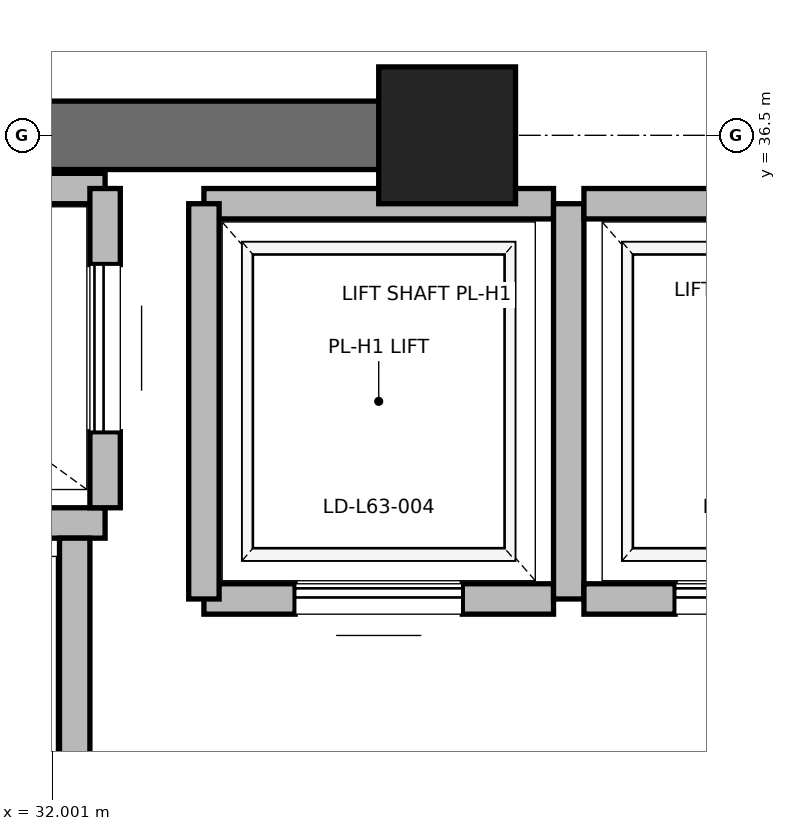
"""IFC4 building model, lengths in metres.
Left out: names, types, materials, properties, quantities, classifications, styles, units other than length and angle.
Written with IfcOpenShell. Run it as: python <this file> out.ifc"""

import sys

from ifc_helpers import new_model, si_unit, direction, frame, frame_2d, origin, origin_2d, place, context, subcontext, project, spatial, rectangle, extrude, element, fill, save


model = new_model("IFC4")
c1 = context("Model", 3, precision=1e-05, world=origin(), true_north=direction((0.0, 1.0)))
c2 = subcontext(c1, "Body", "Model", "MODEL_VIEW")
j1 = project(units=[si_unit("LENGTHUNIT", "METRE"), si_unit("PLANEANGLEUNIT", "RADIAN")], contexts=[c1])
p1 = place(None, origin())
s1 = spatial("IfcSite", under=j1, at=p1, CompositionType="ELEMENT")
p2 = place(p1, origin())
s2 = spatial("IfcBuilding", under=s1, at=p2, CompositionType="ELEMENT")
p3 = place(p2, frame((0.0, 0.0, 271.2)))
s3 = spatial("IfcBuildingStorey", under=s2, at=p3, CompositionType="ELEMENT", Elevation=271.2)
p4 = place(p3, frame((34.6, 36.5, 0.0), z_axis=(0.0, 0.0, 1.0), x_axis=(1.0, 0.0, 0.0)))
e1 = element("IfcColumn", 1, at=p4, inside=s3, PredefinedType="PILASTER", context=c2, shape_type="SweptSolid", body=[
    extrude(rectangle(XDim=0.9, YDim=0.9, at=origin_2d()), origin(), (0.0, 0.0, 1.0), 4.0),
])
p5 = place(p3, frame((29.0, 36.5, 0.0), z_axis=(0.0, 0.0, 1.0), x_axis=(1.0, 0.0, 0.0)))
e2 = element("IfcWall", 2, at=p5, inside=s3, PredefinedType="SHEAR", context=c2, shape_type="SweptSolid", body=[
    extrude(rectangle(XDim=5.8, YDim=0.45, at=frame_2d((2.9, 0.0))), origin(), (0.0, 0.0, 1.0), 3.785),
])
p6 = place(p3, frame((29.55, 33.95, 0.0), z_axis=(0.0, 0.0, 1.0), x_axis=(1.0, 0.0, 0.0)))
e3 = element("IfcWall", 3, at=p6, inside=s3, PredefinedType="SOLIDWALL", context=c2, shape_type="SweptSolid", body=[
    extrude(rectangle(XDim=2.8, YDim=0.2, at=frame_2d((1.4, 0.0))), origin(), (0.0, 0.0, 1.0), 3.785),
])
p7 = place(p3, frame((32.15, 30.85, 0.0), z_axis=(0.0, 0.0, 1.0), x_axis=(0.0, 1.0, 0.0)))
e4 = element("IfcWall", 4, at=p7, inside=s3, PredefinedType="SOLIDWALL", context=c2, shape_type="SweptSolid", body=[
    extrude(rectangle(XDim=3.0, YDim=0.2, at=frame_2d((1.5, 0.0))), origin(), (0.0, 0.0, 1.0), 3.785),
])
p8 = place(p3, frame((32.35, 36.15, 0.0), z_axis=(0.0, 0.0, 1.0), x_axis=(-1.0, 0.0, 0.0)))
e5 = element("IfcWall", 5, at=p8, inside=s3, PredefinedType="SOLIDWALL", context=c2, shape_type="SweptSolid", body=[
    extrude(rectangle(XDim=2.8, YDim=0.2, at=frame_2d((1.4, 0.0))), origin(), (0.0, 0.0, 1.0), 3.148),
])
p9 = place(p3, frame((32.35, 34.05, 0.0), z_axis=(0.0, 0.0, 1.0), x_axis=(0.0, 1.0, 0.0)))
e6 = element("IfcWall", 6, at=p9, inside=s3, PredefinedType="SOLIDWALL", context=c2, shape_type="SweptSolid", body=[
    extrude(rectangle(XDim=2.1, YDim=0.2, at=frame_2d((1.05, 0.0))), origin(), (0.0, 0.0, 1.0), 3.785),
])
p10 = place(p9, frame((0.5, 0.0, 0.0)))
e7 = element("IfcOpeningElement", 7, at=p10, cuts=e6, PredefinedType="OPENING", context=c2, shape_type="SweptSolid", body=[
    extrude(rectangle(XDim=1.1, YDim=2.2, at=frame_2d((0.55, 1.1))), frame((0.0, 0.1, 0.0), z_axis=(0.0, -1.0, 0.0), x_axis=(1.0, 0.0, 0.0)), (0.0, 0.0, 1.0), 0.2),
])
p11 = place(p3, frame((33.0, 33.45, 0.0), z_axis=(0.0, 0.0, 1.0), x_axis=(1.0, 0.0, 0.0)))
e8 = element("IfcWall", 8, at=p11, inside=s3, PredefinedType="SOLIDWALL", context=c2, shape_type="SweptSolid", body=[
    extrude(rectangle(XDim=2.3, YDim=0.2, at=frame_2d((1.15, 0.0))), origin(), (0.0, 0.0, 1.0), 3.785),
])
p12 = place(p11, frame((0.6, 0.0, 0.0)))
e9 = element("IfcOpeningElement", 9, at=p12, cuts=e8, PredefinedType="OPENING", context=c2, shape_type="SweptSolid", body=[
    extrude(rectangle(XDim=1.1, YDim=2.2, at=frame_2d((0.55, 1.1))), frame((0.0, 0.1, 0.0), z_axis=(0.0, -1.0, 0.0), x_axis=(1.0, 0.0, 0.0)), (0.0, 0.0, 1.0), 0.2),
])
p13 = place(p3, frame((35.3, 36.05, 0.0), z_axis=(0.0, 0.0, 1.0), x_axis=(-1.0, 0.0, 0.0)))
e10 = element("IfcWall", 10, at=p13, inside=s3, PredefinedType="SOLIDWALL", context=c2, shape_type="SweptSolid", body=[
    extrude(rectangle(XDim=2.3, YDim=0.2, at=frame_2d((1.15, 0.0))), origin(), (0.0, 0.0, 1.0), 2.865),
])
p14 = place(p3, frame((33.0, 36.05, 0.0), z_axis=(0.0, 0.0, 1.0), x_axis=(0.0, -1.0, 0.0)))
e11 = element("IfcWall", 11, at=p14, inside=s3, PredefinedType="SOLIDWALL", context=c2, shape_type="SweptSolid", body=[
    extrude(rectangle(XDim=2.6, YDim=0.2, at=frame_2d((1.3, 0.0))), origin(), (0.0, 0.0, 1.0), 3.785),
])
p15 = place(p3, frame((35.4, 33.45, 0.0), z_axis=(0.0, 0.0, 1.0), x_axis=(0.0, 1.0, 0.0)))
e12 = element("IfcWall", 12, at=p15, inside=s3, PredefinedType="SOLIDWALL", context=c2, shape_type="SweptSolid", body=[
    extrude(rectangle(XDim=2.6, YDim=0.2, at=frame_2d((1.3, 0.0))), origin(), (0.0, 0.0, 1.0), 2.865),
])
p16 = place(p3, frame((35.5, 33.45, 0.0), z_axis=(0.0, 0.0, 1.0), x_axis=(1.0, 0.0, 0.0)))
e13 = element("IfcWall", 13, at=p16, inside=s3, PredefinedType="SOLIDWALL", context=c2, shape_type="SweptSolid", body=[
    extrude(rectangle(XDim=2.3, YDim=0.2, at=frame_2d((1.15, 0.0))), origin(), (0.0, 0.0, 1.0), 3.785),
])
p17 = place(p16, frame((0.6, 0.0, 0.0)))
e14 = element("IfcOpeningElement", 14, at=p17, cuts=e13, PredefinedType="OPENING", context=c2, shape_type="SweptSolid", body=[
    extrude(rectangle(XDim=1.1, YDim=2.2, at=frame_2d((0.55, 1.1))), frame((0.0, 0.1, 0.0), z_axis=(0.0, -1.0, 0.0), x_axis=(1.0, 0.0, 0.0)), (0.0, 0.0, 1.0), 0.2),
])
p18 = place(p3, frame((37.8, 36.05, 0.0), z_axis=(0.0, 0.0, 1.0), x_axis=(-1.0, 0.0, 0.0)))
e15 = element("IfcWall", 15, at=p18, inside=s3, PredefinedType="SOLIDWALL", context=c2, shape_type="SweptSolid", body=[
    extrude(rectangle(XDim=2.3, YDim=0.2, at=frame_2d((1.15, 0.0))), origin(), (0.0, 0.0, 1.0), 2.865),
])
p19 = place(p10, origin())
e16 = element("IfcDoor", 16, at=p19, inside=s3, OperationType="SLIDING_TO_RIGHT", PredefinedType="DOOR", context=c2, shape_type="SweptSolid", body=[
    extrude(rectangle(XDim=1.1, YDim=2.2, at=frame_2d((0.55, 1.1))), frame((0.0, 0.025, 0.0), z_axis=(0.0, -1.0, 0.0), x_axis=(1.0, 0.0, 0.0)), (0.0, 0.0, 1.0), 0.05),
])
fill(e7, e16)
p20 = place(p12, origin())
e17 = element("IfcDoor", 17, at=p20, inside=s3, OperationType="SLIDING_TO_RIGHT", PredefinedType="DOOR", context=c2, shape_type="SweptSolid", body=[
    extrude(rectangle(XDim=1.1, YDim=2.2, at=frame_2d((0.55, 1.1))), frame((0.0, 0.025, 0.0), z_axis=(0.0, -1.0, 0.0), x_axis=(1.0, 0.0, 0.0)), (0.0, 0.0, 1.0), 0.05),
])
fill(e9, e17)
p21 = place(p17, origin())
e18 = element("IfcDoor", 18, at=p21, inside=s3, OperationType="SLIDING_TO_RIGHT", PredefinedType="DOOR", context=c2, shape_type="SweptSolid", body=[
    extrude(rectangle(XDim=1.1, YDim=2.2, at=frame_2d((0.55, 1.1))), frame((0.0, 0.025, 0.0), z_axis=(0.0, -1.0, 0.0), x_axis=(1.0, 0.0, 0.0)), (0.0, 0.0, 1.0), 0.05),
])
fill(e14, e18)
save(model, sys.argv[1])
